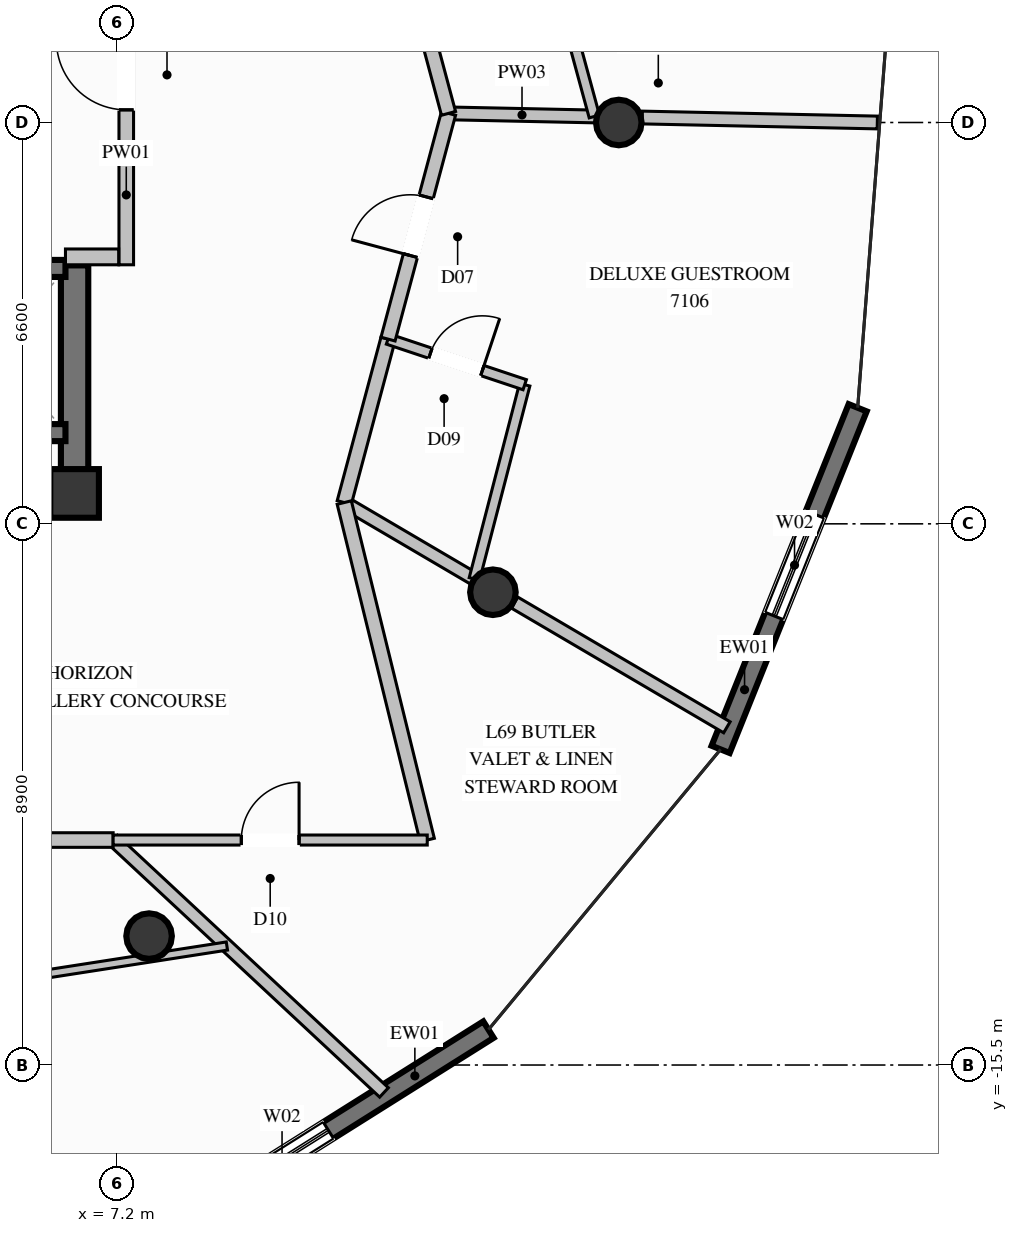
"""IFC4 building model, lengths in metres.
Left out: names, types, materials, properties, quantities, classifications, styles, units other than length and angle.
Written with IfcOpenShell. Run it as: python <this file> out.ifc"""

import sys

from ifc_helpers import new_model, si_unit, direction, frame, frame_2d, origin, origin_2d, place, context, subcontext, project, spatial, rectangle, circle, extrude, element, fill, save


model = new_model("IFC4")
c1 = context("Model", 3, precision=1e-05, world=origin(), true_north=direction((0.0, 1.0)))
c2 = subcontext(c1, "Body", "Model", "MODEL_VIEW")
j1 = project(units=[si_unit("LENGTHUNIT", "METRE"), si_unit("PLANEANGLEUNIT", "RADIAN")], contexts=[c1])
p1 = place(None, origin())
s1 = spatial("IfcSite", under=j1, at=p1, CompositionType="ELEMENT")
p2 = place(p1, origin())
s2 = spatial("IfcBuilding", under=s1, at=p2, CompositionType="ELEMENT")
p3 = place(p2, frame((0.0, 0.0, 266.8)))
s3 = spatial("IfcBuildingStorey", under=s2, at=p3, CompositionType="ELEMENT", Elevation=266.8)
p4 = place(p3, frame((6.5, -6.1, 0.0), z_axis=(0.0, 0.0, 1.0), x_axis=(1.0, 0.0, 0.0)))
e1 = element("IfcColumn", 1, at=p4, inside=s3, PredefinedType="COLUMN", context=c2, shape_type="SweptSolid", body=[
    extrude(rectangle(XDim=0.8, YDim=0.8, at=origin_2d()), origin(), (0.0, 0.0, 1.0), 3.8),
])
p5 = place(p3, frame((4.15, -6.1, 0.0), z_axis=(0.0, 0.0, 1.0), x_axis=(1.0, 0.0, 0.0)))
e2 = element("IfcWall", 2, at=p5, inside=s3, PredefinedType="SHEAR", context=c2, shape_type="SweptSolid", body=[
    extrude(rectangle(XDim=2.125, YDim=0.45, at=frame_2d((1.062, 0.0))), origin(), (0.0, 0.0, 1.0), 3.8),
])
p6 = place(p3, frame((6.5, -6.325, 0.0), z_axis=(0.0, 0.0, 1.0), x_axis=(0.0, 1.0, 0.0)))
e3 = element("IfcWall", 3, at=p6, inside=s3, PredefinedType="SHEAR", context=c2, shape_type="SweptSolid", body=[
    extrude(rectangle(XDim=3.975, YDim=0.45, at=frame_2d((1.987, 0.0))), origin(), (0.0, 0.0, 1.0), 3.8),
])
for number, where, z_axis, x_axis in (
    (4, (15.45, 0.0, 0.0), (0.0, 0.0, 1.0), (1.0, 0.0, 0.0)),
    (5, (7.725, -13.38, 0.0), (0.0, 0.0, 1.0), (1.0, 0.0, 0.0)),
    (6, (13.38, -7.725, 0.0), (0.0, 0.0, 1.0), (1.0, 0.0, 0.0)),
):
    element("IfcColumn", number, at=place(p3, frame(where, z_axis=z_axis, x_axis=x_axis)), inside=s3, PredefinedType="COLUMN", context=c2, shape_type="SweptSolid", body=[
        extrude(circle(Radius=0.375, at=origin_2d()), origin(), (0.0, 0.0, 1.0), 3.8),
    ])
p7 = place(p3, frame((13.307, -14.918, 0.0), z_axis=(0.0, 0.0, 1.0), x_axis=(-0.846622734403, -0.532193522689, 0.0)))
e7 = element("IfcWall", 7, at=p7, inside=s3, PredefinedType="SOLIDWALL", context=c2, shape_type="SweptSolid", body=[
    extrude(rectangle(XDim=5.915, YDim=0.32, at=frame_2d((2.958, 0.0))), origin(), (0.0, 0.0, 1.0), 3.57),
])
p8 = place(p7, frame((3.11, 0.0, 0.35)))
e8 = element("IfcOpeningElement", 8, at=p8, cuts=e7, PredefinedType="OPENING", context=c2, shape_type="SweptSolid", body=[
    extrude(rectangle(XDim=1.8, YDim=2.6, at=frame_2d((0.9, 1.3))), frame((0.0, 0.17, 0.0), z_axis=(0.0, -1.0, 0.0), x_axis=(1.0, 0.0, 0.0)), (0.0, 0.0, 1.0), 0.34),
])
p9 = place(p3, frame((19.379, -4.691, 0.0), z_axis=(0.0, 0.0, 1.0), x_axis=(-0.3723361771, -0.928097931914, 0.0)))
e9 = element("IfcWall", 9, at=p9, inside=s3, PredefinedType="SOLIDWALL", context=c2, shape_type="SweptSolid", body=[
    extrude(rectangle(XDim=6.053, YDim=0.32, at=frame_2d((3.027, 0.0))), origin(), (0.0, 0.0, 1.0), 3.57),
])
p10 = place(p9, frame((1.889, 0.0, 0.35)))
e10 = element("IfcOpeningElement", 10, at=p10, cuts=e9, PredefinedType="OPENING", context=c2, shape_type="SweptSolid", body=[
    extrude(rectangle(XDim=1.8, YDim=2.6, at=frame_2d((0.9, 1.3))), frame((0.0, 0.17, 0.0), z_axis=(0.0, -1.0, 0.0), x_axis=(1.0, 0.0, 0.0)), (0.0, 0.0, 1.0), 0.34),
])
p11 = place(p3, frame((4.15, -5.1, 0.0), z_axis=(0.0, 0.0, 1.0), x_axis=(1.0, 0.0, 0.0)))
e11 = element("IfcWall", 11, at=p11, inside=s3, PredefinedType="SOLIDWALL", context=c2, shape_type="SweptSolid", body=[
    extrude(rectangle(XDim=2.2, YDim=0.28, at=frame_2d((1.1, 0.0))), origin(), (0.0, 0.0, 1.0), 3.57),
])
p12 = place(p3, frame((6.35, -2.4, 0.0), z_axis=(0.0, 0.0, 1.0), x_axis=(-1.0, 0.0, 0.0)))
e12 = element("IfcWall", 12, at=p12, inside=s3, PredefinedType="SOLIDWALL", context=c2, shape_type="SweptSolid", body=[
    extrude(rectangle(XDim=2.2, YDim=0.28, at=frame_2d((1.1, 0.0))), origin(), (0.0, 0.0, 1.0), 3.57),
])
p13 = place(p12, frame((0.5, 0.0, 0.0)))
e13 = element("IfcOpeningElement", 13, at=p13, cuts=e12, PredefinedType="OPENING", context=c2, shape_type="SweptSolid", body=[
    extrude(rectangle(XDim=1.2, YDim=2.2, at=frame_2d((0.6, 1.1))), frame((0.0, 0.15, 0.0), z_axis=(0.0, -1.0, 0.0), x_axis=(1.0, 0.0, 0.0)), (0.0, 0.0, 1.0), 0.3),
])
p14 = place(p3, frame((7.35, -2.34, 0.0), z_axis=(0.0, 0.0, 1.0), x_axis=(0.0, 1.0, 0.0)))
e14 = element("IfcWall", 14, at=p14, inside=s3, PredefinedType="PARTITIONING", context=c2, shape_type="SweptSolid", body=[
    extrude(rectangle(XDim=5.07, YDim=0.24, at=frame_2d((2.535, 0.0))), origin(), (0.0, 0.0, 1.0), 2.655),
])
p15 = place(p14, frame((2.548, 0.0, 0.0)))
e15 = element("IfcOpeningElement", 15, at=p15, cuts=e14, PredefinedType="OPENING", context=c2, shape_type="SweptSolid", body=[
    extrude(rectangle(XDim=1.15, YDim=2.2, at=frame_2d((0.575, 1.1))), frame((0.0, 0.13, 0.0), z_axis=(0.0, -1.0, 0.0), x_axis=(1.0, 0.0, 0.0)), (0.0, 0.0, 1.0), 0.26),
])
p16 = place(p3, frame((6.35, -2.21, 0.0), z_axis=(0.0, 0.0, 1.0), x_axis=(1.0, 0.0, 0.0)))
e16 = element("IfcWall", 16, at=p16, inside=s3, PredefinedType="PARTITIONING", context=c2, shape_type="SweptSolid", body=[
    extrude(rectangle(XDim=0.875, YDim=0.26, at=frame_2d((0.438, 0.0))), origin(), (0.0, 0.0, 1.0), 3.57),
])
p17 = place(p3, frame((12.65, 0.15, 0.0), z_axis=(0.0, 0.0, 1.0), x_axis=(0.999779360872, -0.02100546536, 0.0)))
e17 = element("IfcWall", 17, at=p17, inside=s3, PredefinedType="PARTITIONING", context=c2, shape_type="SweptSolid", body=[
    extrude(rectangle(XDim=2.417, YDim=0.21, at=frame_2d((1.209, 0.0))), origin(), (0.0, 0.0, 1.0), 3.57),
])
p18 = place(p3, frame((15.836, 0.082, 0.0), z_axis=(0.0, 0.0, 1.0), x_axis=(0.999774956848, -0.021214043922, 0.0)))
e18 = element("IfcWall", 18, at=p18, inside=s3, PredefinedType="PARTITIONING", context=c2, shape_type="SweptSolid", body=[
    extrude(rectangle(XDim=3.867, YDim=0.21, at=frame_2d((1.934, 0.0))), origin(), (0.0, 0.0, 1.0), 3.57),
])
p19 = place(p3, frame((10.935, -6.25, 0.0), z_axis=(0.0, 0.0, 1.0), x_axis=(0.862250119525, -0.506482705903, 0.0)))
e19 = element("IfcWall", 19, at=p19, inside=s3, PredefinedType="PARTITIONING", context=c2, shape_type="SweptSolid", body=[
    extrude(rectangle(XDim=2.462, YDim=0.21, at=frame_2d((1.231, 0.0))), origin(), (0.0, 0.0, 1.0), 3.085),
])
p20 = place(p3, frame((13.736, -7.895, 0.0), z_axis=(0.0, 0.0, 1.0), x_axis=(0.862264130703, -0.506458852132, 0.0)))
e20 = element("IfcWall", 20, at=p20, inside=s3, PredefinedType="PARTITIONING", context=c2, shape_type="SweptSolid", body=[
    extrude(rectangle(XDim=4.05, YDim=0.21, at=frame_2d((2.025, 0.0))), origin(), (0.0, 0.0, 1.0), 3.57),
])
p21 = place(p3, frame((10.935, -6.25, 0.0), z_axis=(0.0, 0.0, 1.0), x_axis=(0.258727314432, 0.96595040078, 0.0)))
e21 = element("IfcWall", 21, at=p21, inside=s3, PredefinedType="PARTITIONING", context=c2, shape_type="SweptSolid", body=[
    extrude(rectangle(XDim=2.783, YDim=0.24, at=frame_2d((1.391, 0.0))), origin(), (0.0, 0.0, 1.0), 3.57),
])
p22 = place(p3, frame((13.075, -7.507, 0.0), z_axis=(0.0, 0.0, 1.0), x_axis=(0.250897983288, 0.968013533987, 0.0)))
e22 = element("IfcWall", 22, at=p22, inside=s3, PredefinedType="PLUMBINGWALL", context=c2, shape_type="SweptSolid", body=[
    extrude(rectangle(XDim=3.301, YDim=0.175, at=frame_2d((1.65, 0.0))), origin(), (0.0, 0.0, 1.0), 3.137),
])
p23 = place(p3, frame((11.655, -3.562, 0.0), z_axis=(0.0, 0.0, 1.0), x_axis=(0.948600850467, -0.316475001372, 0.0)))
e23 = element("IfcWall", 23, at=p23, inside=s3, PredefinedType="PLUMBINGWALL", context=c2, shape_type="SweptSolid", body=[
    extrude(rectangle(XDim=2.37, YDim=0.175, at=frame_2d((1.185, 0.0))), origin(), (0.0, 0.0, 1.0), 3.57),
])
p24 = place(p23, frame((0.735, 0.0, 0.0)))
e24 = element("IfcOpeningElement", 24, at=p24, cuts=e23, PredefinedType="OPENING", context=c2, shape_type="SweptSolid", body=[
    extrude(rectangle(XDim=0.9, YDim=2.1, at=frame_2d((0.45, 1.05))), frame((0.0, 0.098, 0.0), z_axis=(0.0, -1.0, 0.0), x_axis=(1.0, 0.0, 0.0)), (0.0, 0.0, 1.0), 0.195),
])
p25 = place(p3, frame((11.655, -3.562, 0.0), z_axis=(0.0, 0.0, 1.0), x_axis=(0.258884274469, 0.965908345772, 0.0)))
e25 = element("IfcWall", 25, at=p25, inside=s3, PredefinedType="PARTITIONING", context=c2, shape_type="SweptSolid", body=[
    extrude(rectangle(XDim=3.843, YDim=0.24, at=frame_2d((1.921, 0.0))), origin(), (0.0, 0.0, 1.0), 3.57),
])
p26 = place(p25, frame((1.422, 0.0, 0.0)))
e26 = element("IfcOpeningElement", 26, at=p26, cuts=e25, PredefinedType="OPENING", context=c2, shape_type="SweptSolid", body=[
    extrude(rectangle(XDim=1.0, YDim=2.2, at=frame_2d((0.5, 1.1))), frame((0.0, 0.13, 0.0), z_axis=(0.0, -1.0, 0.0), x_axis=(1.0, 0.0, 0.0)), (0.0, 0.0, 1.0), 0.26),
])
p27 = place(p3, frame((12.65, 0.15, 0.0), z_axis=(0.0, 0.0, 1.0), x_axis=(-0.258727314432, 0.96595040078, 0.0)))
e27 = element("IfcWall", 27, at=p27, inside=s3, PredefinedType="PARTITIONING", context=c2, shape_type="SweptSolid", body=[
    extrude(rectangle(XDim=2.783, YDim=0.24, at=frame_2d((1.391, 0.0))), origin(), (0.0, 0.0, 1.0), 3.57),
])
p28 = place(p3, frame((15.048, 0.099, 0.0), z_axis=(0.0, 0.0, 1.0), x_axis=(-0.262319881737, 0.964980973722, 0.0)))
e28 = element("IfcWall", 28, at=p28, inside=s3, PredefinedType="PLUMBINGWALL", context=c2, shape_type="SweptSolid", body=[
    extrude(rectangle(XDim=3.29, YDim=0.175, at=frame_2d((1.645, 0.0))), origin(), (0.0, 0.0, 1.0), 3.137),
])
p29 = place(p3, frame((7.134, -11.8, 0.0), z_axis=(0.0, 0.0, 1.0), x_axis=(0.731644317953, -0.681686579013, 0.0)))
e29 = element("IfcWall", 29, at=p29, inside=s3, PredefinedType="PARTITIONING", context=c2, shape_type="SweptSolid", body=[
    extrude(rectangle(XDim=6.089, YDim=0.21, at=frame_2d((3.044, 0.0))), origin(), (0.0, 0.0, 1.0), 3.57),
])
p30 = place(p3, frame((0.0, -11.8, 0.0), z_axis=(0.0, 0.0, 1.0), x_axis=(1.0, 0.0, 0.0)))
e30 = element("IfcWall", 30, at=p30, inside=s3, PredefinedType="PARTITIONING", context=c2, shape_type="SweptSolid", body=[
    extrude(rectangle(XDim=7.134, YDim=0.24, at=frame_2d((3.567, 0.0))), origin(), (0.0, 0.0, 1.0), 3.57),
])
p31 = place(p3, frame((0.169, -14.913, 0.0), z_axis=(0.0, 0.0, 1.0), x_axis=(0.988190446512, 0.153230680422, 0.0)))
e31 = element("IfcWall", 31, at=p31, inside=s3, PredefinedType="PARTITIONING", context=c2, shape_type="SweptSolid", body=[
    extrude(rectangle(XDim=8.942, YDim=0.135, at=frame_2d((4.471, 0.0))), origin(), (0.0, 0.0, 1.0), 3.137),
])
p32 = place(p31, frame((3.996, 0.0, 0.0)))
e32 = element("IfcOpeningElement", 32, at=p32, cuts=e31, PredefinedType="OPENING", context=c2, shape_type="SweptSolid", body=[
    extrude(rectangle(XDim=0.95, YDim=2.1, at=frame_2d((0.475, 1.05))), frame((0.0, 0.078, 0.0), z_axis=(0.0, -1.0, 0.0), x_axis=(1.0, 0.0, 0.0)), (0.0, 0.0, 1.0), 0.155),
])
p33 = place(p3, frame((12.3, -11.8, 0.0), z_axis=(0.0, 0.0, 1.0), x_axis=(-0.238825099749, 0.971062599285, 0.0)))
e33 = element("IfcWall", 33, at=p33, inside=s3, PredefinedType="PARTITIONING", context=c2, shape_type="SweptSolid", body=[
    extrude(rectangle(XDim=5.715, YDim=0.24, at=frame_2d((2.858, 0.0))), origin(), (0.0, 0.0, 1.0), 3.57),
])
p34 = place(p3, frame((7.134, -11.8, 0.0), z_axis=(0.0, 0.0, 1.0), x_axis=(1.0, 0.0, 0.0)))
e34 = element("IfcWall", 34, at=p34, inside=s3, PredefinedType="PARTITIONING", context=c2, shape_type="SweptSolid", body=[
    extrude(rectangle(XDim=5.166, YDim=0.165, at=frame_2d((2.583, 0.0))), origin(), (0.0, 0.0, 1.0), 3.57),
])
p35 = place(p34, frame((2.108, 0.0, 0.0)))
e35 = element("IfcOpeningElement", 35, at=p35, cuts=e34, PredefinedType="OPENING", context=c2, shape_type="SweptSolid", body=[
    extrude(rectangle(XDim=0.95, YDim=2.1, at=frame_2d((0.475, 1.05))), frame((0.0, 0.093, 0.0), z_axis=(0.0, -1.0, 0.0), x_axis=(1.0, 0.0, 0.0)), (0.0, 0.0, 1.0), 0.185),
])
p36 = place(p8, origin())
e36 = element("IfcWindow", 36, at=p36, inside=s3, PartitioningType="SINGLE_PANEL", PredefinedType="WINDOW", context=c2, shape_type="SweptSolid", body=[
    extrude(rectangle(XDim=1.8, YDim=2.6, at=frame_2d((0.9, 1.3))), frame((0.0, 0.03, 0.0), z_axis=(0.0, -1.0, 0.0), x_axis=(1.0, 0.0, 0.0)), (0.0, 0.0, 1.0), 0.06),
])
fill(e8, e36)
p37 = place(p10, origin())
e37 = element("IfcWindow", 37, at=p37, inside=s3, PartitioningType="SINGLE_PANEL", PredefinedType="WINDOW", context=c2, shape_type="SweptSolid", body=[
    extrude(rectangle(XDim=1.8, YDim=2.6, at=frame_2d((0.9, 1.3))), frame((0.0, 0.03, 0.0), z_axis=(0.0, -1.0, 0.0), x_axis=(1.0, 0.0, 0.0)), (0.0, 0.0, 1.0), 0.06),
])
fill(e10, e37)
p38 = place(p15, origin())
e38 = element("IfcDoor", 38, at=p38, inside=s3, OperationType="SINGLE_SWING_RIGHT", PredefinedType="DOOR", context=c2, shape_type="SweptSolid", body=[
    extrude(rectangle(XDim=1.15, YDim=2.2, at=frame_2d((0.575, 1.1))), frame((0.0, 0.025, 0.0), z_axis=(0.0, -1.0, 0.0), x_axis=(1.0, 0.0, 0.0)), (0.0, 0.0, 1.0), 0.05),
])
fill(e15, e38)
p39 = place(p24, origin())
e39 = element("IfcDoor", 39, at=p39, inside=s3, OperationType="SINGLE_SWING_RIGHT", PredefinedType="DOOR", context=c2, shape_type="SweptSolid", body=[
    extrude(rectangle(XDim=0.9, YDim=2.1, at=frame_2d((0.45, 1.05))), frame((0.0, 0.025, 0.0), z_axis=(0.0, -1.0, 0.0), x_axis=(1.0, 0.0, 0.0)), (0.0, 0.0, 1.0), 0.05),
])
fill(e24, e39)
p40 = place(p26, origin())
e40 = element("IfcDoor", 40, at=p40, inside=s3, OperationType="SINGLE_SWING_LEFT", PredefinedType="DOOR", context=c2, shape_type="SweptSolid", body=[
    extrude(rectangle(XDim=1.0, YDim=2.2, at=frame_2d((0.5, 1.1))), frame((0.0, 0.025, 0.0), z_axis=(0.0, -1.0, 0.0), x_axis=(1.0, 0.0, 0.0)), (0.0, 0.0, 1.0), 0.05),
])
fill(e26, e40)
p41 = place(p35, origin())
e41 = element("IfcDoor", 41, at=p41, inside=s3, OperationType="SINGLE_SWING_RIGHT", PredefinedType="DOOR", context=c2, shape_type="SweptSolid", body=[
    extrude(rectangle(XDim=0.95, YDim=2.1, at=frame_2d((0.475, 1.05))), frame((0.0, 0.025, 0.0), z_axis=(0.0, -1.0, 0.0), x_axis=(1.0, 0.0, 0.0)), (0.0, 0.0, 1.0), 0.05),
])
fill(e35, e41)
save(model, sys.argv[1])
